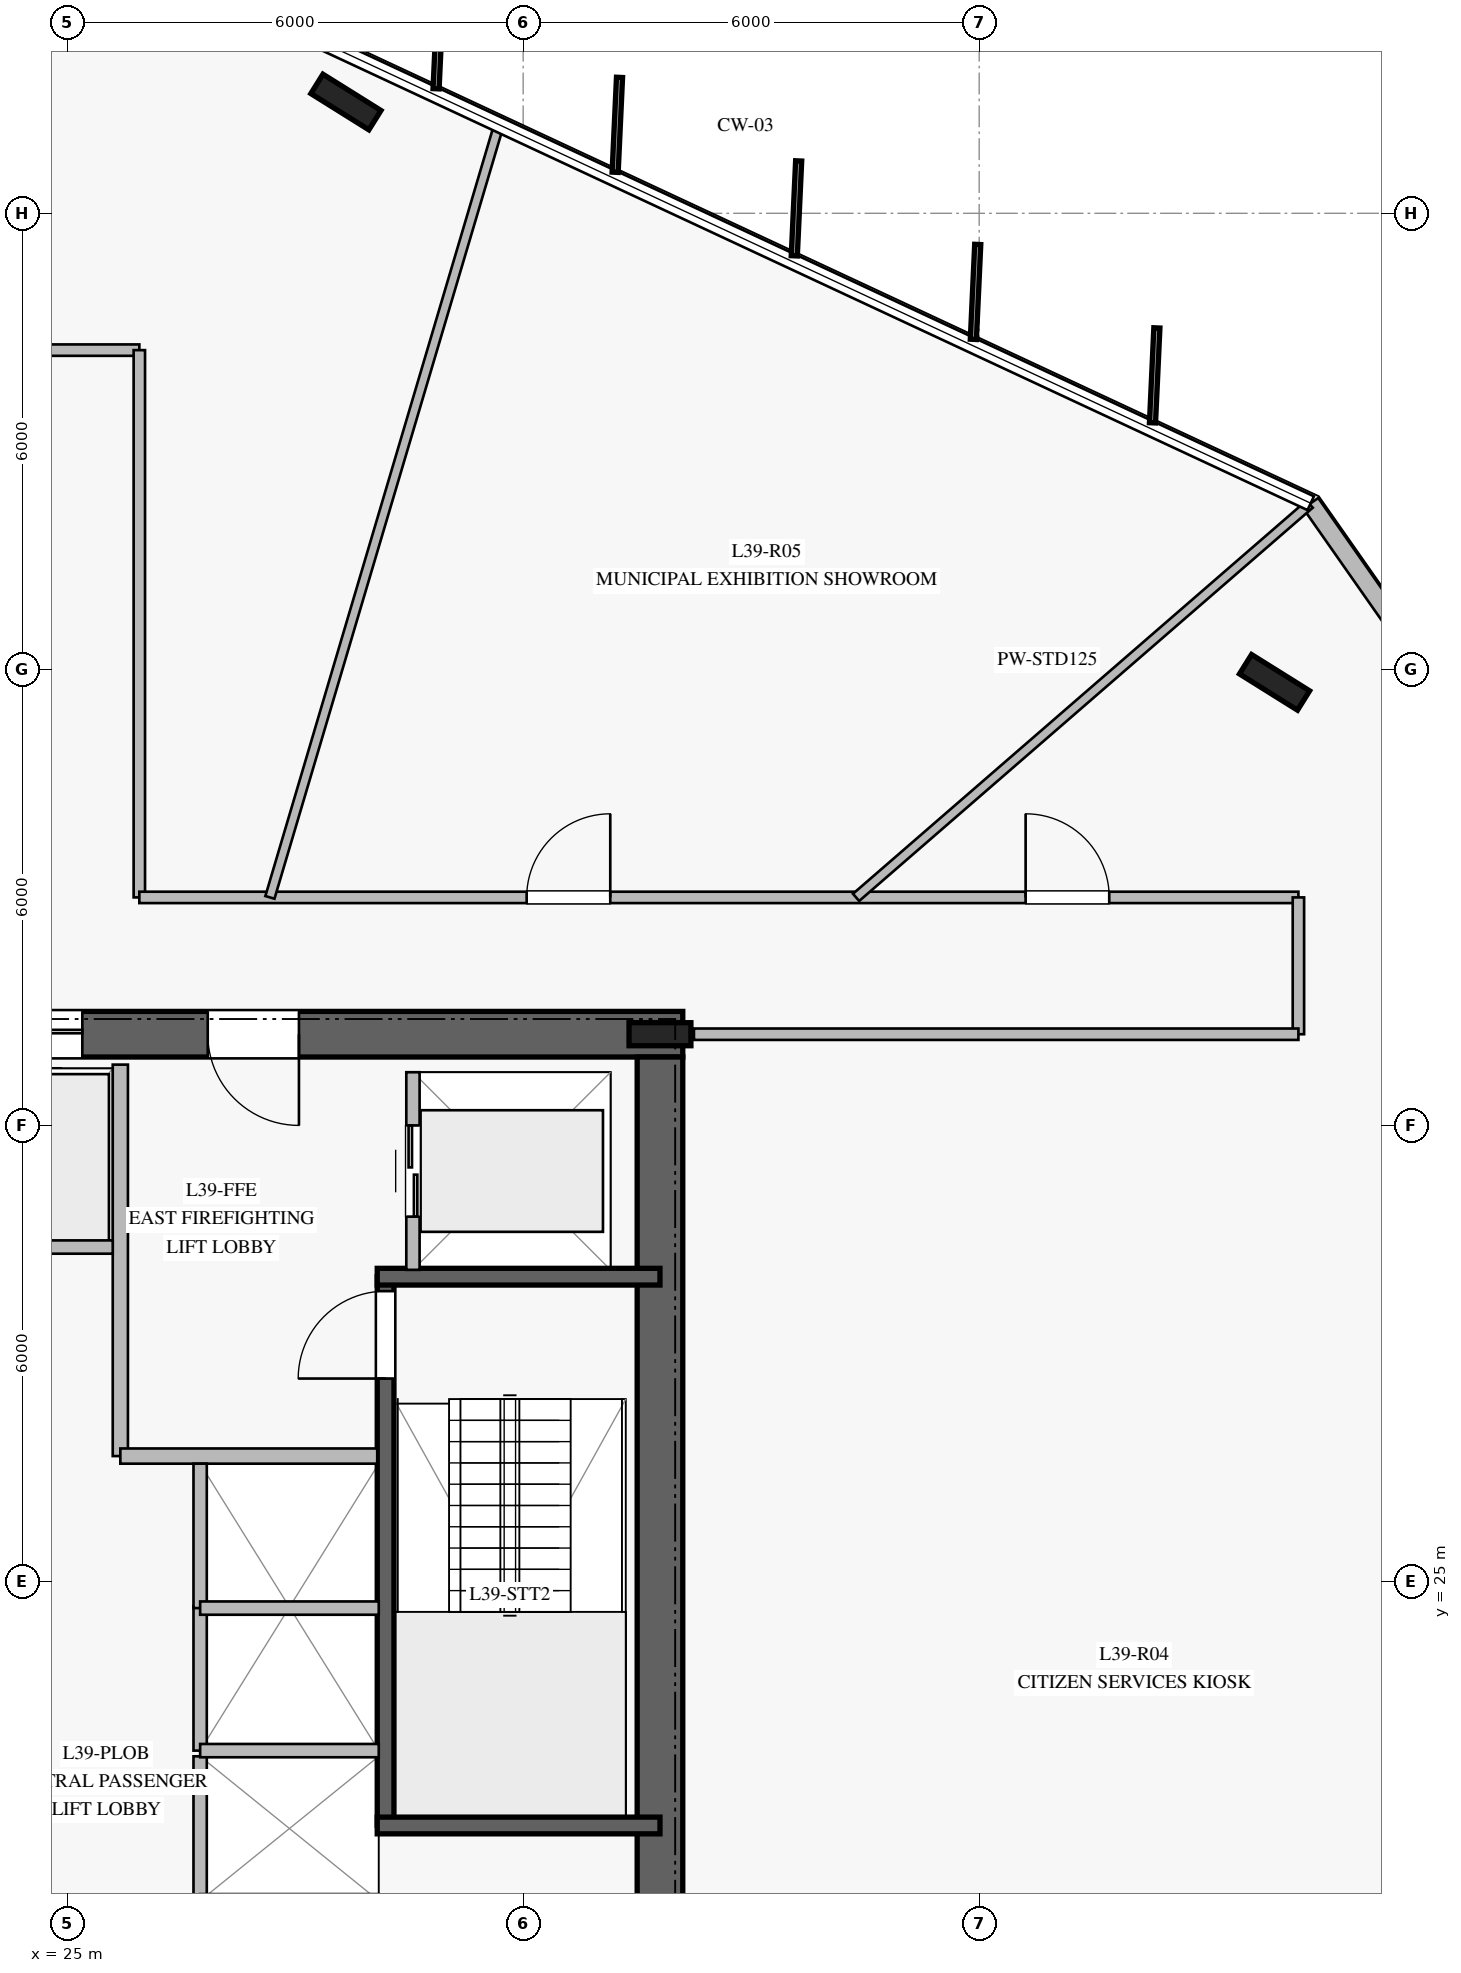
"""IFC4 building model, lengths in metres.
Left out: names, types, materials, properties, quantities, classifications, styles, units other than length and angle.
Written with IfcOpenShell. Run it as: python <this file> out.ifc"""

import sys

from ifc_helpers import new_model, si_unit, direction, frame, frame_2d, origin, origin_2d, place, context, subcontext, project, spatial, rectangle, i_section, extrude, element, fill, save


model = new_model("IFC4")
c1 = context("Model", 3, precision=1e-05, world=origin(), true_north=direction((0.0, 1.0)))
c2 = subcontext(c1, "Body", "Model", "MODEL_VIEW")
j1 = project(units=[si_unit("LENGTHUNIT", "METRE"), si_unit("PLANEANGLEUNIT", "RADIAN")], contexts=[c1])
p1 = place(None, origin())
s1 = spatial("IfcSite", under=j1, at=p1, CompositionType="ELEMENT")
p2 = place(p1, origin())
s2 = spatial("IfcBuilding", under=s1, at=p2, CompositionType="ELEMENT")
p3 = place(p2, frame((0.0, 0.0, 162.4)))
s3 = spatial("IfcBuildingStorey", under=s2, at=p3, CompositionType="ELEMENT", Elevation=162.4)
p4 = place(p3, frame((33.1, 32.2, 0.0), z_axis=(0.0, 0.0, 1.0), x_axis=(-1.0, 0.0, 0.0)))
e1 = element("IfcWall", 1, at=p4, inside=s3, PredefinedType="SHEAR", context=c2, shape_type="SweptSolid", body=[
    extrude(rectangle(XDim=16.2, YDim=0.6, at=frame_2d((8.1, 0.0))), origin(), (0.0, 0.0, 1.0), 3.76),
])
p5 = place(p4, frame((5.05, 0.0, 0.0)))
e2 = element("IfcOpeningElement", 2, at=p5, cuts=e1, PredefinedType="OPENING", context=c2, shape_type="SweptSolid", body=[
    extrude(rectangle(XDim=1.2, YDim=2.25, at=frame_2d((0.6, 1.125))), frame((0.0, 0.31, 0.0), z_axis=(0.0, -1.0, 0.0), x_axis=(1.0, 0.0, 0.0)), (0.0, 0.0, 1.0), 0.62),
])
p6 = place(p4, frame((11.85, 0.0, 0.0)))
e3 = element("IfcOpeningElement", 3, at=p6, cuts=e1, PredefinedType="OPENING", context=c2, shape_type="SweptSolid", body=[
    extrude(rectangle(XDim=1.1, YDim=2.2, at=frame_2d((0.55, 1.1))), frame((0.0, 0.31, 0.0), z_axis=(0.0, -1.0, 0.0), x_axis=(1.0, 0.0, 0.0)), (0.0, 0.0, 1.0), 0.62),
])
p7 = place(p4, frame((9.875, 0.0, 0.0)))
e4 = element("IfcOpeningElement", 4, at=p7, cuts=e1, PredefinedType="OPENING", context=c2, shape_type="SweptSolid", body=[
    extrude(rectangle(XDim=1.1, YDim=2.2, at=frame_2d((0.55, 1.1))), frame((0.0, 0.31, 0.0), z_axis=(0.0, -1.0, 0.0), x_axis=(1.0, 0.0, 0.0)), (0.0, 0.0, 1.0), 0.62),
])
p8 = place(p4, frame((7.9, 0.0, 0.0)))
e5 = element("IfcOpeningElement", 5, at=p8, cuts=e1, PredefinedType="OPENING", context=c2, shape_type="SweptSolid", body=[
    extrude(rectangle(XDim=1.1, YDim=2.2, at=frame_2d((0.55, 1.1))), frame((0.0, 0.31, 0.0), z_axis=(0.0, -1.0, 0.0), x_axis=(1.0, 0.0, 0.0)), (0.0, 0.0, 1.0), 0.62),
])
p9 = place(p3, frame((32.8, 18.1, 0.0), z_axis=(0.0, 0.0, 1.0), x_axis=(0.0, 1.0, 0.0)))
e6 = element("IfcWall", 6, at=p9, inside=s3, PredefinedType="SHEAR", context=c2, shape_type="SweptSolid", body=[
    extrude(rectangle(XDim=13.8, YDim=0.6, at=frame_2d((6.9, 0.0))), origin(), (0.0, 0.0, 1.0), 3.76),
])
p10 = place(p3, frame((32.8, 32.2, 0.0), z_axis=(0.0, 0.0, 1.0), x_axis=(1.0, 0.0, 0.0)))
e7 = element("IfcColumn", 7, at=p10, inside=s3, PredefinedType="COLUMN", context=c2, shape_type="SweptSolid", body=[
    extrude(i_section(OverallWidth=0.303, OverallDepth=0.814, WebThickness=0.021, FlangeThickness=0.04, at=origin_2d()), origin(), (0.0, 0.0, 1.0), 4.0),
])
p11 = place(p3, frame((29.19, 21.79, 0.0), z_axis=(0.0, 0.0, 1.0), x_axis=(0.0, 1.0, 0.0)))
e8 = element("IfcWall", 8, at=p11, inside=s3, PredefinedType="SOLIDWALL", context=c2, shape_type="SweptSolid", body=[
    extrude(rectangle(XDim=7.22, YDim=0.22, at=frame_2d((3.61, 0.0))), origin(), (0.0, 0.0, 1.0), 3.76),
])
p12 = place(p11, frame((5.88, 0.0, 0.0)))
e9 = element("IfcOpeningElement", 9, at=p12, cuts=e8, PredefinedType="OPENING", context=c2, shape_type="SweptSolid", body=[
    extrude(rectangle(XDim=1.15, YDim=2.2, at=frame_2d((0.575, 1.1))), frame((0.0, 0.12, 0.0), z_axis=(0.0, -1.0, 0.0), x_axis=(1.0, 0.0, 0.0)), (0.0, 0.0, 1.0), 0.24),
])
for number, where, z_axis, x_axis in (
    (10, (29.08, 21.79, 0.0), (0.0, 0.0, 1.0), (1.0, 0.0, 0.0)),
    (11, (29.08, 29.01, 0.0), (0.0, 0.0, 1.0), (1.0, 0.0, 0.0)),
):
    element("IfcWall", number, at=place(p3, frame(where, z_axis=z_axis, x_axis=x_axis)), inside=s3, PredefinedType="SOLIDWALL", context=c2, shape_type="SweptSolid", body=[
        extrude(rectangle(XDim=3.72, YDim=0.22, at=frame_2d((1.86, 0.0))), origin(), (0.0, 0.0, 1.0), 3.76),
    ])
for number, where, z_axis, x_axis in (
    (12, (40.886, 36.829, 0.0), (0.0, 0.0, 1.0), (-0.848, 0.53, 0.0)),
    (13, (28.668, 44.464, 0.0), (0.0, 0.0, 1.0), (-0.848, 0.53, 0.0)),
):
    element("IfcColumn", number, at=place(p3, frame(where, z_axis=z_axis, x_axis=x_axis)), inside=s3, PredefinedType="COLUMN", context=c2, shape_type="SweptSolid", body=[
        extrude(i_section(OverallWidth=0.3, OverallDepth=0.9, WebThickness=0.019, FlangeThickness=0.035, at=origin_2d()), origin(), (0.0, 0.0, 1.0), 4.0),
    ])
p13 = place(p3, frame((43.927, 35.524, 0.0), z_axis=(0.0, 0.0, 1.0), x_axis=(-0.57368221041, 0.819077970317, 0.0)))
e14 = element("IfcWall", 14, at=p13, inside=s3, PredefinedType="STANDARD", context=c2, shape_type="SweptSolid", body=[
    extrude(rectangle(XDim=4.471, YDim=0.24, at=frame_2d((2.235, 0.0))), origin(), (0.0, 0.0, 1.0), 3.76),
])
p14 = place(p3, frame((25.7, 26.65, 0.0), z_axis=(0.0, 0.0, 1.0), x_axis=(0.0, 1.0, 0.0)))
e15 = element("IfcWall", 15, at=p14, inside=s3, PredefinedType="PARTITIONING", context=c2, shape_type="SweptSolid", body=[
    extrude(rectangle(XDim=5.15, YDim=0.2, at=frame_2d((2.575, 0.0))), origin(), (0.0, 0.0, 1.0), 3.76),
])
p15 = place(p3, frame((25.7, 26.65, 0.0), z_axis=(0.0, 0.0, 1.0), x_axis=(1.0, 0.0, 0.0)))
e16 = element("IfcWall", 16, at=p15, inside=s3, PredefinedType="PARTITIONING", context=c2, shape_type="SweptSolid", body=[
    extrude(rectangle(XDim=3.38, YDim=0.2, at=frame_2d((1.69, 0.0))), origin(), (0.0, 0.0, 1.0), 3.76),
])
p16 = place(p3, frame((23.7, 29.4, 0.0), z_axis=(0.0, 0.0, 1.0), x_axis=(1.0, 0.0, 0.0)))
e17 = element("IfcWall", 17, at=p16, inside=s3, PredefinedType="PARTITIONING", context=c2, shape_type="SweptSolid", body=[
    extrude(rectangle(XDim=1.9, YDim=0.175, at=frame_2d((0.95, 0.0))), origin(), (0.0, 0.0, 1.0), 3.76),
])
p17 = place(p3, frame((26.75, 20.8, 0.0), z_axis=(0.0, 0.0, 1.0), x_axis=(0.0, 1.0, 0.0)))
e18 = element("IfcWall", 18, at=p17, inside=s3, PredefinedType="PARTITIONING", context=c2, shape_type="SweptSolid", body=[
    extrude(rectangle(XDim=1.9, YDim=0.175, at=frame_2d((0.95, 0.0))), origin(), (0.0, 0.0, 1.0), 3.76),
])
p18 = place(p3, frame((26.75, 22.775, 0.0), z_axis=(0.0, 0.0, 1.0), x_axis=(0.0, 1.0, 0.0)))
e19 = element("IfcWall", 19, at=p18, inside=s3, PredefinedType="PARTITIONING", context=c2, shape_type="SweptSolid", body=[
    extrude(rectangle(XDim=1.9, YDim=0.175, at=frame_2d((0.95, 0.0))), origin(), (0.0, 0.0, 1.0), 3.76),
])
p19 = place(p3, frame((26.75, 22.775, 0.0), z_axis=(0.0, 0.0, 1.0), x_axis=(1.0, 0.0, 0.0)))
e20 = element("IfcWall", 20, at=p19, inside=s3, PredefinedType="PARTITIONING", context=c2, shape_type="SweptSolid", body=[
    extrude(rectangle(XDim=2.35, YDim=0.175, at=frame_2d((1.175, 0.0))), origin(), (0.0, 0.0, 1.0), 3.76),
])
p20 = place(p3, frame((26.75, 24.65, 0.0), z_axis=(0.0, 0.0, 1.0), x_axis=(0.0, 1.0, 0.0)))
e21 = element("IfcWall", 21, at=p20, inside=s3, PredefinedType="PARTITIONING", context=c2, shape_type="SweptSolid", body=[
    extrude(rectangle(XDim=1.9, YDim=0.175, at=frame_2d((0.95, 0.0))), origin(), (0.0, 0.0, 1.0), 3.76),
])
p21 = place(p3, frame((26.75, 24.65, 0.0), z_axis=(0.0, 0.0, 1.0), x_axis=(1.0, 0.0, 0.0)))
e22 = element("IfcWall", 22, at=p21, inside=s3, PredefinedType="PARTITIONING", context=c2, shape_type="SweptSolid", body=[
    extrude(rectangle(XDim=2.35, YDim=0.175, at=frame_2d((1.175, 0.0))), origin(), (0.0, 0.0, 1.0), 3.76),
])
p22 = place(p3, frame((29.55, 29.1, 0.0), z_axis=(0.0, 0.0, 1.0), x_axis=(0.0, 1.0, 0.0)))
e23 = element("IfcWall", 23, at=p22, inside=s3, PredefinedType="PARTITIONING", context=c2, shape_type="SweptSolid", body=[
    extrude(rectangle(XDim=2.6, YDim=0.175, at=frame_2d((1.3, 0.0))), origin(), (0.0, 0.0, 1.0), 3.76),
])
p23 = place(p22, frame((0.7, 0.0, 0.0)))
e24 = element("IfcOpeningElement", 24, at=p23, cuts=e23, PredefinedType="OPENING", context=c2, shape_type="SweptSolid", body=[
    extrude(rectangle(XDim=1.2, YDim=2.2, at=frame_2d((0.6, 1.1))), frame((0.0, 0.098, 0.0), z_axis=(0.0, -1.0, 0.0), x_axis=(1.0, 0.0, 0.0)), (0.0, 0.0, 1.0), 0.195),
])
p24 = place(p3, frame((24.05, 41.2, 0.0), z_axis=(0.0, 0.0, 1.0), x_axis=(1.0, 0.0, 0.0)))
e25 = element("IfcWall", 25, at=p24, inside=s3, PredefinedType="PARTITIONING", context=c2, shape_type="SweptSolid", body=[
    extrude(rectangle(XDim=1.9, YDim=0.15, at=frame_2d((0.95, 0.0))), origin(), (0.0, 0.0, 1.0), 3.76),
])
p25 = place(p3, frame((25.95, 41.2, 0.0), z_axis=(0.0, 0.0, 1.0), x_axis=(0.0, -1.0, 0.0)))
e26 = element("IfcWall", 26, at=p25, inside=s3, PredefinedType="PARTITIONING", context=c2, shape_type="SweptSolid", body=[
    extrude(rectangle(XDim=7.2, YDim=0.15, at=frame_2d((3.6, 0.0))), origin(), (0.0, 0.0, 1.0), 3.36),
])
p26 = place(p3, frame((25.95, 34.0, 0.0), z_axis=(0.0, 0.0, 1.0), x_axis=(1.0, 0.0, 0.0)))
e27 = element("IfcWall", 27, at=p26, inside=s3, PredefinedType="PARTITIONING", context=c2, shape_type="SweptSolid", body=[
    extrude(rectangle(XDim=15.25, YDim=0.15, at=frame_2d((7.625, 0.0))), origin(), (0.0, 0.0, 1.0), 3.21),
])
p27 = place(p26, frame((11.661, 0.0, 0.0)))
e28 = element("IfcOpeningElement", 28, at=p27, cuts=e27, PredefinedType="OPENING", context=c2, shape_type="SweptSolid", body=[
    extrude(rectangle(XDim=1.1, YDim=2.2, at=frame_2d((0.55, 1.1))), frame((0.0, 0.085, 0.0), z_axis=(0.0, -1.0, 0.0), x_axis=(1.0, 0.0, 0.0)), (0.0, 0.0, 1.0), 0.17),
])
p28 = place(p26, frame((5.096, 0.0, 0.0)))
e29 = element("IfcOpeningElement", 29, at=p28, cuts=e27, PredefinedType="OPENING", context=c2, shape_type="SweptSolid", body=[
    extrude(rectangle(XDim=1.1, YDim=2.2, at=frame_2d((0.55, 1.1))), frame((0.0, 0.085, 0.0), z_axis=(0.0, -1.0, 0.0), x_axis=(1.0, 0.0, 0.0)), (0.0, 0.0, 1.0), 0.17),
])
p29 = place(p3, frame((41.2, 34.0, 0.0), z_axis=(0.0, 0.0, 1.0), x_axis=(0.0, -1.0, 0.0)))
e30 = element("IfcWall", 30, at=p29, inside=s3, PredefinedType="PARTITIONING", context=c2, shape_type="SweptSolid", body=[
    extrude(rectangle(XDim=1.8, YDim=0.15, at=frame_2d((0.9, 0.0))), origin(), (0.0, 0.0, 1.0), 3.76),
])
p30 = place(p3, frame((41.2, 32.2, 0.0), z_axis=(0.0, 0.0, 1.0), x_axis=(-1.0, 0.0, 0.0)))
e31 = element("IfcWall", 31, at=p30, inside=s3, PredefinedType="PARTITIONING", context=c2, shape_type="SweptSolid", body=[
    extrude(rectangle(XDim=7.953, YDim=0.15, at=frame_2d((3.977, 0.0))), origin(), (0.0, 0.0, 1.0), 3.21),
])
p31 = place(p3, frame((35.38, 34.0, 0.0), z_axis=(0.0, 0.0, 1.0), x_axis=(0.755576888345, 0.655059971147, 0.0)))
e32 = element("IfcWall", 32, at=p31, inside=s3, PredefinedType="PARTITIONING", context=c2, shape_type="SweptSolid", body=[
    extrude(rectangle(XDim=7.899, YDim=0.125, at=frame_2d((3.949, 0.0))), origin(), (0.0, 0.0, 1.0), 3.16),
])
p32 = place(p3, frame((27.668, 34.0, 0.0), z_axis=(0.0, 0.0, 1.0), x_axis=(0.284232016895, 0.95875552701, 0.0)))
e33 = element("IfcWall", 33, at=p32, inside=s3, PredefinedType="PARTITIONING", context=c2, shape_type="SweptSolid", body=[
    extrude(rectangle(XDim=10.586, YDim=0.125, at=frame_2d((5.293, 0.0))), origin(), (0.0, 0.0, 1.0), 3.16),
])
p33 = place(p12, origin())
e34 = element("IfcDoor", 34, at=p33, inside=s3, OperationType="SINGLE_SWING_LEFT", PredefinedType="DOOR", context=c2, shape_type="SweptSolid", body=[
    extrude(rectangle(XDim=1.15, YDim=2.2, at=frame_2d((0.575, 1.1))), frame((0.0, 0.025, 0.0), z_axis=(0.0, -1.0, 0.0), x_axis=(1.0, 0.0, 0.0)), (0.0, 0.0, 1.0), 0.05),
])
fill(e9, e34)
p34 = place(p5, origin())
e35 = element("IfcDoor", 35, at=p34, inside=s3, OperationType="SINGLE_SWING_LEFT", PredefinedType="DOOR", context=c2, shape_type="SweptSolid", body=[
    extrude(rectangle(XDim=1.2, YDim=2.25, at=frame_2d((0.6, 1.125))), frame((0.0, 0.025, 0.0), z_axis=(0.0, -1.0, 0.0), x_axis=(1.0, 0.0, 0.0)), (0.0, 0.0, 1.0), 0.05),
])
fill(e2, e35)
p35 = place(p8, origin())
e36 = element("IfcDoor", 36, at=p35, inside=s3, OperationType="DOUBLE_DOOR_SLIDING", PredefinedType="DOOR", context=c2, shape_type="SweptSolid", body=[
    extrude(rectangle(XDim=1.1, YDim=2.2, at=frame_2d((0.55, 1.1))), frame((0.0, 0.025, 0.0), z_axis=(0.0, -1.0, 0.0), x_axis=(1.0, 0.0, 0.0)), (0.0, 0.0, 1.0), 0.05),
])
fill(e5, e36)
p36 = place(p23, origin())
e37 = element("IfcDoor", 37, at=p36, inside=s3, OperationType="DOUBLE_DOOR_SLIDING", PredefinedType="DOOR", context=c2, shape_type="SweptSolid", body=[
    extrude(rectangle(XDim=1.2, YDim=2.2, at=frame_2d((0.6, 1.1))), frame((0.0, 0.025, 0.0), z_axis=(0.0, -1.0, 0.0), x_axis=(1.0, 0.0, 0.0)), (0.0, 0.0, 1.0), 0.05),
])
fill(e24, e37)
p37 = place(p27, origin())
e38 = element("IfcDoor", 38, at=p37, inside=s3, OperationType="SINGLE_SWING_LEFT", PredefinedType="DOOR", context=c2, shape_type="SweptSolid", body=[
    extrude(rectangle(XDim=1.1, YDim=2.2, at=frame_2d((0.55, 1.1))), frame((0.0, 0.025, 0.0), z_axis=(0.0, -1.0, 0.0), x_axis=(1.0, 0.0, 0.0)), (0.0, 0.0, 1.0), 0.05),
])
fill(e28, e38)
p38 = place(p28, origin())
e39 = element("IfcDoor", 39, at=p38, inside=s3, OperationType="SINGLE_SWING_RIGHT", PredefinedType="DOOR", context=c2, shape_type="SweptSolid", body=[
    extrude(rectangle(XDim=1.1, YDim=2.2, at=frame_2d((0.55, 1.1))), frame((0.0, 0.025, 0.0), z_axis=(0.0, -1.0, 0.0), x_axis=(1.0, 0.0, 0.0)), (0.0, 0.0, 1.0), 0.05),
])
fill(e29, e39)
save(model, sys.argv[1])
